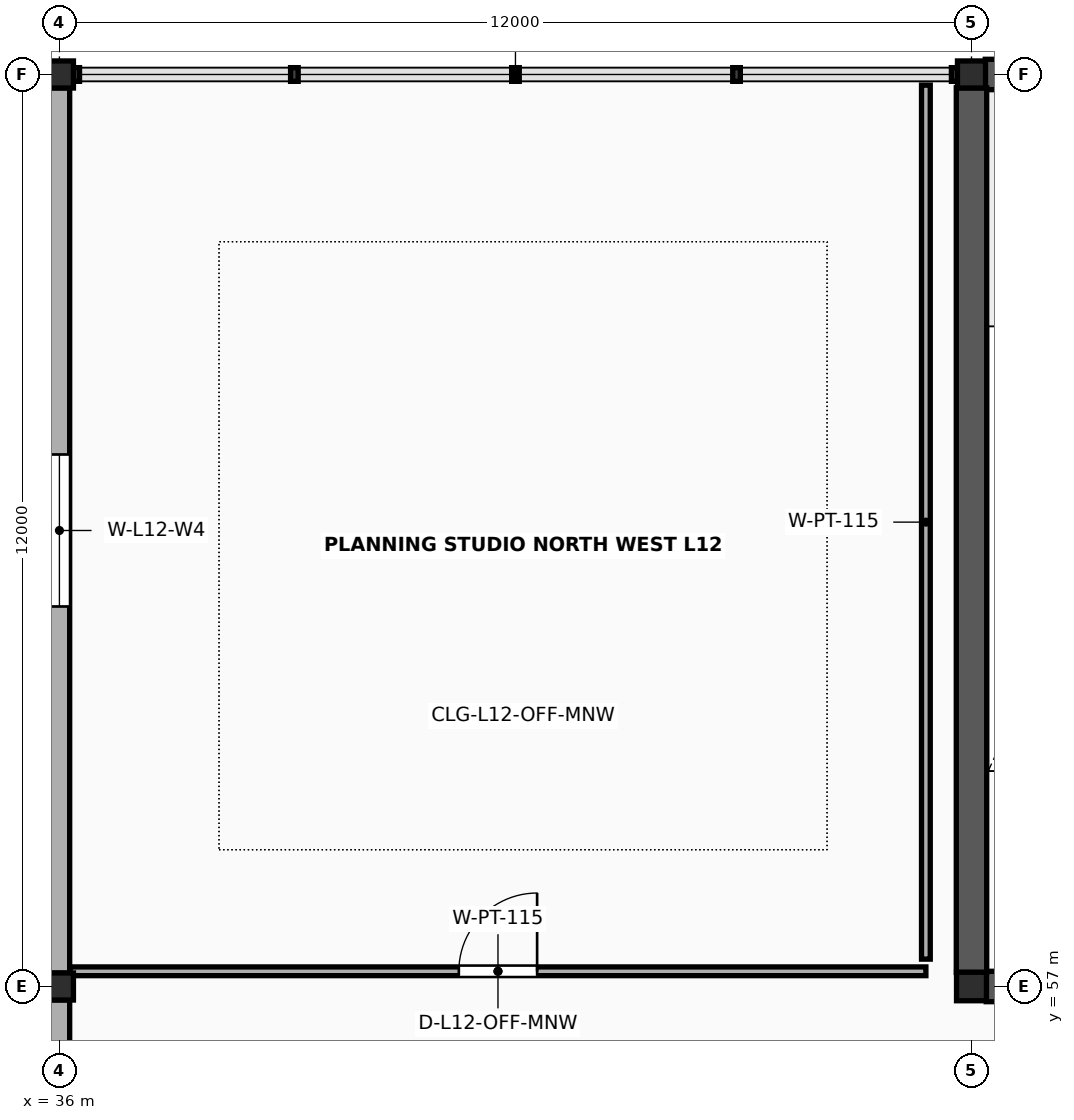
"""IFC4 building model, lengths in metres.
Left out: names, types, materials, properties, quantities, classifications, styles, units other than length and angle.
Written with IfcOpenShell. Run it as: python <this file> out.ifc"""

import sys

from ifc_helpers import new_model, si_unit, direction, frame, frame_2d, origin, origin_2d, place, context, subcontext, project, spatial, rectangle, i_section, extrude, element, fill, save


model = new_model("IFC4")
c1 = context("Model", 3, precision=1e-05, world=origin(), true_north=direction((0.0, 1.0)))
c2 = subcontext(c1, "Body", "Model", "MODEL_VIEW")
j1 = project(units=[si_unit("LENGTHUNIT", "METRE"), si_unit("PLANEANGLEUNIT", "RADIAN")], contexts=[c1])
p1 = place(None, origin())
s1 = spatial("IfcSite", under=j1, at=p1, CompositionType="ELEMENT")
p2 = place(p1, origin())
s2 = spatial("IfcBuilding", under=s1, at=p2, CompositionType="ELEMENT")
p3 = place(p2, frame((0.0, 0.0, 49.6)))
s3 = spatial("IfcBuildingStorey", under=s2, at=p3, CompositionType="ELEMENT", Elevation=49.6)
for number, where, z_axis, x_axis in (
    (1, (36.0, 57.0, 0.0), (0.0, 0.0, 1.0), (1.0, 0.0, 0.0)),
    (2, (36.0, 69.0, 0.0), (0.0, 0.0, 1.0), (1.0, 0.0, 0.0)),
):
    element("IfcColumn", number, at=place(p3, frame(where, z_axis=z_axis, x_axis=x_axis)), inside=s3, PredefinedType="COLUMN", context=c2, shape_type="SweptSolid", body=[
        extrude(i_section(OverallWidth=0.369, OverallDepth=0.356, WebThickness=0.011, FlangeThickness=0.018, FilletRadius=0.018, at=origin_2d()), origin(), (0.0, 0.0, 1.0), 4.0),
    ])
p4 = place(p3, frame((48.0, 57.0, 0.0), z_axis=(0.0, 0.0, 1.0), x_axis=(1.0, 0.0, 0.0)))
e3 = element("IfcColumn", 3, at=p4, inside=s3, PredefinedType="COLUMN", context=c2, shape_type="SweptSolid", body=[
    extrude(i_section(OverallWidth=0.394, OverallDepth=0.375, WebThickness=0.017, FlangeThickness=0.028, FilletRadius=0.018, at=origin_2d()), origin(), (0.0, 0.0, 1.0), 4.0),
])
p5 = place(p3, frame((48.0, 69.0, 0.0), z_axis=(0.0, 0.0, 1.0), x_axis=(1.0, 0.0, 0.0)))
e4 = element("IfcColumn", 4, at=p5, inside=s3, PredefinedType="COLUMN", context=c2, shape_type="SweptSolid", body=[
    extrude(i_section(OverallWidth=0.369, OverallDepth=0.356, WebThickness=0.011, FlangeThickness=0.018, FilletRadius=0.018, at=origin_2d()), origin(), (0.0, 0.0, 1.0), 4.0),
])
p6 = place(p3, frame((48.194, 57.0, 0.0), z_axis=(0.0, 0.0, 1.0), x_axis=(1.0, 0.0, 0.0)))
e5 = element("IfcWall", 5, at=p6, inside=s3, PredefinedType="SHEAR", context=c2, shape_type="SweptSolid", body=[
    extrude(rectangle(XDim=11.612, YDim=0.4, at=frame_2d((5.806, 0.0))), origin(), (0.0, 0.0, 1.0), 3.848),
])
p7 = place(p6, frame((5.006, 0.0, 0.0)))
e6 = element("IfcOpeningElement", 6, at=p7, cuts=e5, PredefinedType="OPENING", context=c2, shape_type="SweptSolid", body=[
    extrude(rectangle(XDim=1.2, YDim=2.2, at=frame_2d((0.6, 1.1))), frame((0.0, 0.215, 0.0), z_axis=(0.0, -1.0, 0.0), x_axis=(1.0, 0.0, 0.0)), (0.0, 0.0, 1.0), 0.43),
])
p8 = place(p6, frame((8.706, 0.0, 0.0)))
e7 = element("IfcOpeningElement", 7, at=p8, cuts=e5, PredefinedType="OPENING", context=c2, shape_type="SweptSolid", body=[
    extrude(rectangle(XDim=1.5, YDim=2.25, at=frame_2d((0.75, 1.125))), frame((0.0, 0.215, 0.0), z_axis=(0.0, -1.0, 0.0), x_axis=(1.0, 0.0, 0.0)), (0.0, 0.0, 1.0), 0.43),
])
p9 = place(p3, frame((48.181, 69.0, 0.0), z_axis=(0.0, 0.0, 1.0), x_axis=(1.0, 0.0, 0.0)))
e8 = element("IfcWall", 8, at=p9, inside=s3, PredefinedType="SHEAR", context=c2, shape_type="SweptSolid", body=[
    extrude(rectangle(XDim=11.637, YDim=0.4, at=frame_2d((5.819, 0.0))), origin(), (0.0, 0.0, 1.0), 3.848),
])
p10 = place(p3, frame((48.0, 57.185, 0.0), z_axis=(0.0, 0.0, 1.0), x_axis=(0.0, 1.0, 0.0)))
e9 = element("IfcWall", 9, at=p10, inside=s3, PredefinedType="SHEAR", context=c2, shape_type="SweptSolid", body=[
    extrude(rectangle(XDim=11.64, YDim=0.4, at=frame_2d((5.82, 0.0))), origin(), (0.0, 0.0, 1.0), 3.848),
])
p11 = place(p3, frame((36.0, 45.176, 0.0), z_axis=(0.0, 0.0, 1.0), x_axis=(0.0, 1.0, 0.0)))
e10 = element("IfcWall", 10, at=p11, inside=s3, PredefinedType="SOLIDWALL", context=c2, shape_type="SweptSolid", body=[
    extrude(rectangle(XDim=11.648, YDim=0.27, at=frame_2d((5.824, 0.0))), origin(), (0.0, 0.0, 1.0), 3.301),
])
p12 = place(p11, frame((4.904, 0.0, 0.78)))
e11 = element("IfcOpeningElement", 11, at=p12, cuts=e10, PredefinedType="OPENING", context=c2, shape_type="SweptSolid", body=[
    extrude(rectangle(XDim=1.84, YDim=1.42, at=frame_2d((0.92, 0.71))), frame((0.0, 0.15, 0.0), z_axis=(0.0, -1.0, 0.0), x_axis=(1.0, 0.0, 0.0)), (0.0, 0.0, 1.0), 0.3),
])
p13 = place(p3, frame((36.0, 57.176, 0.0), z_axis=(0.0, 0.0, 1.0), x_axis=(0.0, 1.0, 0.0)))
e12 = element("IfcWall", 12, at=p13, inside=s3, PredefinedType="SOLIDWALL", context=c2, shape_type="SweptSolid", body=[
    extrude(rectangle(XDim=11.648, YDim=0.27, at=frame_2d((5.824, 0.0))), origin(), (0.0, 0.0, 1.0), 3.301),
])
p14 = place(p13, frame((4.824, 0.0, 0.78)))
e13 = element("IfcOpeningElement", 13, at=p14, cuts=e12, PredefinedType="OPENING", context=c2, shape_type="SweptSolid", body=[
    extrude(rectangle(XDim=2.0, YDim=1.42, at=frame_2d((1.0, 0.71))), frame((0.0, 0.15, 0.0), z_axis=(0.0, -1.0, 0.0), x_axis=(1.0, 0.0, 0.0)), (0.0, 0.0, 1.0), 0.3),
])
p15 = place(p3, frame((36.14, 57.2, 0.0), z_axis=(0.0, 0.0, 1.0), x_axis=(1.0, 0.0, 0.0)))
e14 = element("IfcWall", 14, at=p15, inside=s3, PredefinedType="PARTITIONING", context=c2, shape_type="SweptSolid", body=[
    extrude(rectangle(XDim=11.26, YDim=0.115, at=frame_2d((5.63, 0.0))), origin(), (0.0, 0.0, 1.0), 2.88),
])
p16 = place(p15, frame((5.115, 0.0, 0.0)))
e15 = element("IfcOpeningElement", 15, at=p16, cuts=e14, PredefinedType="OPENING", context=c2, shape_type="SweptSolid", body=[
    extrude(rectangle(XDim=1.03, YDim=2.17, at=frame_2d((0.515, 1.085))), frame((0.0, 0.073, 0.0), z_axis=(0.0, -1.0, 0.0), x_axis=(1.0, 0.0, 0.0)), (0.0, 0.0, 1.0), 0.145),
])
p17 = place(p3, frame((47.4, 57.36, 0.0), z_axis=(0.0, 0.0, 1.0), x_axis=(0.0, 1.0, 0.0)))
e16 = element("IfcWall", 16, at=p17, inside=s3, PredefinedType="PARTITIONING", context=c2, shape_type="SweptSolid", body=[
    extrude(rectangle(XDim=11.5, YDim=0.115, at=frame_2d((5.75, 0.0))), origin(), (0.0, 0.0, 1.0), 2.88),
])
p18 = place(p14, origin())
e17 = element("IfcWindow", 17, at=p18, inside=s3, PartitioningType="DOUBLE_PANEL_VERTICAL", PredefinedType="WINDOW", context=c2, shape_type="SweptSolid", body=[
    extrude(rectangle(XDim=2.0, YDim=1.42, at=frame_2d((1.0, 0.71))), frame((0.0, 0.03, 0.0), z_axis=(0.0, -1.0, 0.0), x_axis=(1.0, 0.0, 0.0)), (0.0, 0.0, 1.0), 0.06),
])
fill(e13, e17)
p19 = place(p16, origin())
e18 = element("IfcDoor", 18, at=p19, inside=s3, OperationType="SINGLE_SWING_RIGHT", PredefinedType="DOOR", context=c2, shape_type="SweptSolid", body=[
    extrude(rectangle(XDim=1.03, YDim=2.17, at=frame_2d((0.515, 1.085))), frame((0.0, 0.025, 0.0), z_axis=(0.0, -1.0, 0.0), x_axis=(1.0, 0.0, 0.0)), (0.0, 0.0, 1.0), 0.05),
])
fill(e15, e18)
save(model, sys.argv[1])
